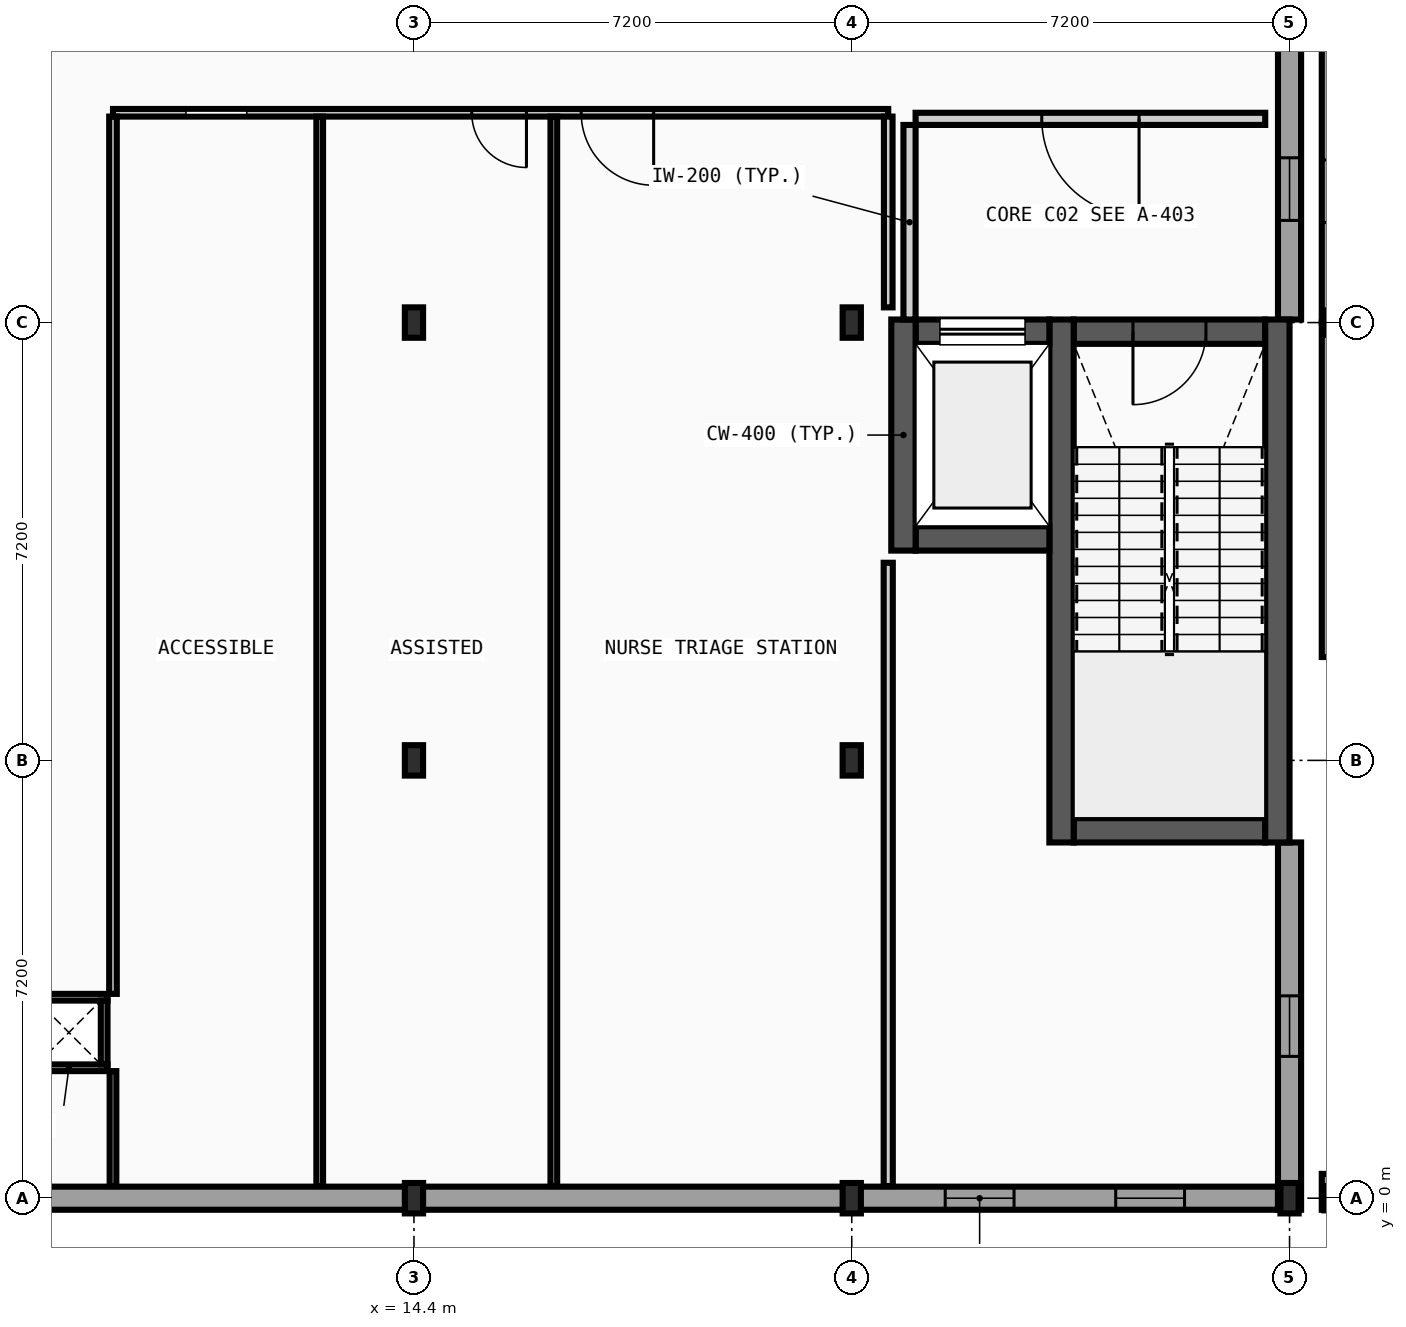
"""IFC4 building model, lengths in metres.
Left out: names, types, materials, properties, quantities, classifications, styles, units other than length and angle.
Written with IfcOpenShell. Run it as: python <this file> out.ifc"""

import sys

from ifc_helpers import new_model, si_unit, direction, frame, frame_2d, origin, origin_2d, place, context, subcontext, project, spatial, rectangle, i_section, extrude, element, fill, save


model = new_model("IFC4")
c1 = context("Model", 3, precision=1e-05, world=origin(), true_north=direction((0.0, 1.0)))
c2 = subcontext(c1, "Body", "Model", "MODEL_VIEW")
j1 = project(units=[si_unit("LENGTHUNIT", "METRE"), si_unit("PLANEANGLEUNIT", "RADIAN")], contexts=[c1])
p1 = place(None, origin())
s1 = spatial("IfcSite", under=j1, at=p1, CompositionType="ELEMENT")
p2 = place(p1, origin())
s2 = spatial("IfcBuilding", under=s1, at=p2, CompositionType="ELEMENT")
p3 = place(p2, frame((0.0, 0.0, 5.2)))
s3 = spatial("IfcBuildingStorey", under=s2, at=p3, CompositionType="ELEMENT", Elevation=5.2)
for number, where, z_axis, x_axis in (
    (1, (14.4, 0.0, 0.0), (0.0, 0.0, 1.0), (1.0, 0.0, 0.0)),
    (2, (14.4, 7.2, 0.0), (0.0, 0.0, 1.0), (1.0, 0.0, 0.0)),
    (3, (14.4, 14.4, 0.0), (0.0, 0.0, 1.0), (1.0, 0.0, 0.0)),
    (4, (21.6, 0.0, 0.0), (0.0, 0.0, 1.0), (1.0, 0.0, 0.0)),
    (5, (21.6, 7.2, 0.0), (0.0, 0.0, 1.0), (1.0, 0.0, 0.0)),
    (6, (21.6, 14.4, 0.0), (0.0, 0.0, 1.0), (1.0, 0.0, 0.0)),
    (7, (28.8, 0.0, 0.0), (0.0, 0.0, 1.0), (1.0, 0.0, 0.0)),
):
    element("IfcColumn", number, at=place(p3, frame(where, z_axis=z_axis, x_axis=x_axis)), inside=s3, PredefinedType="COLUMN", context=c2, shape_type="SweptSolid", body=[
        extrude(i_section(OverallWidth=0.3, OverallDepth=0.5, WebThickness=0.014, FlangeThickness=0.028, FilletRadius=0.027, at=origin_2d()), origin(), (0.0, 0.0, 1.0), 4.4),
    ])
for number, where, z_axis, x_axis in (
    (8, (29.52, 0.0, 0.0), (0.0, 0.0, 1.0), (1.0, 0.0, 0.0)),
    (9, (29.52, 14.4, 0.0), (0.0, 0.0, 1.0), (1.0, 0.0, 0.0)),
):
    element("IfcColumn", number, at=place(p3, frame(where, z_axis=z_axis, x_axis=x_axis)), inside=s3, PredefinedType="COLUMN", context=c2, shape_type="SweptSolid", body=[
        extrude(i_section(OverallWidth=0.3, OverallDepth=0.4, WebThickness=0.013, FlangeThickness=0.024, FilletRadius=0.027, at=origin_2d()), origin(), (0.0, 0.0, 1.0), 4.4),
    ])
p4 = place(p3, frame((7.2, 0.0, 0.0), z_axis=(0.0, 0.0, 1.0), x_axis=(1.0, 0.0, 0.0)))
e10 = element("IfcWall", 10, at=p4, inside=s3, PredefinedType="STANDARD", context=c2, shape_type="SweptSolid", body=[
    extrude(rectangle(XDim=7.2, YDim=0.38, at=frame_2d((3.6, 0.0))), origin(), (0.0, 0.0, 1.0), 3.88),
])
p5 = place(p3, frame((14.4, 0.0, 0.0), z_axis=(0.0, 0.0, 1.0), x_axis=(1.0, 0.0, 0.0)))
e11 = element("IfcWall", 11, at=p5, inside=s3, PredefinedType="STANDARD", context=c2, shape_type="SweptSolid", body=[
    extrude(rectangle(XDim=7.2, YDim=0.38, at=frame_2d((3.6, 0.0))), origin(), (0.0, 0.0, 1.0), 3.88),
])
p6 = place(p3, frame((21.6, 0.0, 0.0), z_axis=(0.0, 0.0, 1.0), x_axis=(1.0, 0.0, 0.0)))
e12 = element("IfcWall", 12, at=p6, inside=s3, PredefinedType="STANDARD", context=c2, shape_type="SweptSolid", body=[
    extrude(rectangle(XDim=7.01, YDim=0.38, at=frame_2d((3.505, 0.0))), origin(), (0.0, 0.0, 1.0), 3.88),
])
p7 = place(p6, frame((1.537, 0.0, 0.95)))
e13 = element("IfcOpeningElement", 13, at=p7, cuts=e12, PredefinedType="OPENING", context=c2, shape_type="SweptSolid", body=[
    extrude(rectangle(XDim=1.132, YDim=1.26, at=frame_2d((0.566, 0.63))), frame((0.0, 0.2, 0.0), z_axis=(0.0, -1.0, 0.0), x_axis=(1.0, 0.0, 0.0)), (0.0, 0.0, 1.0), 0.4),
])
p8 = place(p6, frame((4.341, 0.0, 0.95)))
e14 = element("IfcOpeningElement", 14, at=p8, cuts=e12, PredefinedType="OPENING", context=c2, shape_type="SweptSolid", body=[
    extrude(rectangle(XDim=1.132, YDim=1.26, at=frame_2d((0.566, 0.63))), frame((0.0, 0.2, 0.0), z_axis=(0.0, -1.0, 0.0), x_axis=(1.0, 0.0, 0.0)), (0.0, 0.0, 1.0), 0.4),
])
p9 = place(p3, frame((28.8, -0.19, 0.0), z_axis=(0.0, 0.0, 1.0), x_axis=(0.0, 1.0, 0.0)))
e15 = element("IfcWall", 15, at=p9, inside=s3, PredefinedType="STANDARD", context=c2, shape_type="SweptSolid", body=[
    extrude(rectangle(XDim=6.04, YDim=0.38, at=frame_2d((3.02, 0.0))), origin(), (0.0, 0.0, 1.0), 4.185),
])
p10 = place(p9, frame((2.522, 0.0, 0.95)))
e16 = element("IfcOpeningElement", 16, at=p10, cuts=e15, PredefinedType="OPENING", context=c2, shape_type="SweptSolid", body=[
    extrude(rectangle(XDim=0.996, YDim=1.296, at=frame_2d((0.498, 0.648))), frame((0.0, 0.2, 0.0), z_axis=(0.0, -1.0, 0.0), x_axis=(1.0, 0.0, 0.0)), (0.0, 0.0, 1.0), 0.4),
])
p11 = place(p3, frame((28.8, 14.45, 0.0), z_axis=(0.0, 0.0, 1.0), x_axis=(0.0, 1.0, 0.0)))
e17 = element("IfcWall", 17, at=p11, inside=s3, PredefinedType="STANDARD", context=c2, shape_type="SweptSolid", body=[
    extrude(rectangle(XDim=7.15, YDim=0.38, at=frame_2d((3.575, 0.0))), origin(), (0.0, 0.0, 1.0), 4.185),
])
p12 = place(p11, frame((1.63, 0.0, 0.95)))
e18 = element("IfcOpeningElement", 18, at=p12, cuts=e17, PredefinedType="OPENING", context=c2, shape_type="SweptSolid", body=[
    extrude(rectangle(XDim=1.03, YDim=1.296, at=frame_2d((0.515, 0.648))), frame((0.0, 0.2, 0.0), z_axis=(0.0, -1.0, 0.0), x_axis=(1.0, 0.0, 0.0)), (0.0, 0.0, 1.0), 0.4),
])
p13 = place(p11, frame((4.49, 0.0, 0.95)))
e19 = element("IfcOpeningElement", 19, at=p13, cuts=e17, PredefinedType="OPENING", context=c2, shape_type="SweptSolid", body=[
    extrude(rectangle(XDim=1.03, YDim=1.296, at=frame_2d((0.515, 0.648))), frame((0.0, 0.2, 0.0), z_axis=(0.0, -1.0, 0.0), x_axis=(1.0, 0.0, 0.0)), (0.0, 0.0, 1.0), 0.4),
])
p14 = place(p3, frame((29.52, 0.4, 0.0), z_axis=(0.0, 0.0, 1.0), x_axis=(0.0, -1.0, 0.0)))
e20 = element("IfcWall", 20, at=p14, inside=s3, PredefinedType="STANDARD", context=c2, shape_type="SweptSolid", body=[
    extrude(rectangle(XDim=0.59, YDim=0.38, at=frame_2d((0.295, 0.0))), origin(), (0.0, 0.0, 1.0), 4.185),
])
p15 = place(p3, frame((29.52, 14.4, 0.0), z_axis=(0.0, 0.0, 1.0), x_axis=(0.0, -1.0, 0.0)))
e21 = element("IfcWall", 21, at=p15, inside=s3, PredefinedType="STANDARD", context=c2, shape_type="SweptSolid", body=[
    extrude(rectangle(XDim=5.5, YDim=0.38, at=frame_2d((2.75, 0.0))), origin(), (0.0, 0.0, 1.0), 4.185),
])
p16 = place(p3, frame((29.52, 21.6, 0.0), z_axis=(0.0, 0.0, 1.0), x_axis=(0.0, -1.0, 0.0)))
e22 = element("IfcWall", 22, at=p16, inside=s3, PredefinedType="STANDARD", context=c2, shape_type="SweptSolid", body=[
    extrude(rectangle(XDim=7.2, YDim=0.38, at=frame_2d((3.6, 0.0))), origin(), (0.0, 0.0, 1.0), 3.88),
])
p17 = place(p16, frame((1.645, 0.0, 0.95)))
e23 = element("IfcOpeningElement", 23, at=p17, cuts=e22, PredefinedType="OPENING", context=c2, shape_type="SweptSolid", body=[
    extrude(rectangle(XDim=1.03, YDim=1.332, at=frame_2d((0.515, 0.666))), frame((0.0, 0.2, 0.0), z_axis=(0.0, -1.0, 0.0), x_axis=(1.0, 0.0, 0.0)), (0.0, 0.0, 1.0), 0.4),
])
p18 = place(p16, frame((4.525, 0.0, 0.95)))
e24 = element("IfcOpeningElement", 24, at=p18, cuts=e22, PredefinedType="OPENING", context=c2, shape_type="SweptSolid", body=[
    extrude(rectangle(XDim=1.03, YDim=1.332, at=frame_2d((0.515, 0.666))), frame((0.0, 0.2, 0.0), z_axis=(0.0, -1.0, 0.0), x_axis=(1.0, 0.0, 0.0)), (0.0, 0.0, 1.0), 0.4),
])
p19 = place(p3, frame((25.25, 6.05, 0.0), z_axis=(0.0, 0.0, 1.0), x_axis=(1.0, 0.0, 0.0)))
e25 = element("IfcWall", 25, at=p19, inside=s3, PredefinedType="SHEAR", context=c2, shape_type="SweptSolid", body=[
    extrude(rectangle(XDim=3.15, YDim=0.4, at=frame_2d((1.575, 0.0))), origin(), (0.0, 0.0, 1.0), 4.185),
])
p20 = place(p3, frame((25.25, 14.25, 0.0), z_axis=(0.0, 0.0, 1.0), x_axis=(1.0, 0.0, 0.0)))
e26 = element("IfcWall", 26, at=p20, inside=s3, PredefinedType="SHEAR", context=c2, shape_type="SweptSolid", body=[
    extrude(rectangle(XDim=3.15, YDim=0.4, at=frame_2d((1.575, 0.0))), origin(), (0.0, 0.0, 1.0), 4.185),
])
p21 = place(p20, frame((0.975, 0.0, 0.0)))
e27 = element("IfcOpeningElement", 27, at=p21, cuts=e26, PredefinedType="OPENING", context=c2, shape_type="SweptSolid", body=[
    extrude(rectangle(XDim=1.2, YDim=2.15, at=frame_2d((0.6, 1.075))), frame((0.0, 0.21, 0.0), z_axis=(0.0, -1.0, 0.0), x_axis=(1.0, 0.0, 0.0)), (0.0, 0.0, 1.0), 0.42),
])
for number, where, z_axis, x_axis in (
    (28, (25.05, 5.85, 0.0), (0.0, 0.0, 1.0), (0.0, 1.0, 0.0)),
    (29, (28.6, 5.85, 0.0), (0.0, 0.0, 1.0), (0.0, 1.0, 0.0)),
):
    element("IfcWall", number, at=place(p3, frame(where, z_axis=z_axis, x_axis=x_axis)), inside=s3, PredefinedType="SHEAR", context=c2, shape_type="SweptSolid", body=[
        extrude(rectangle(XDim=8.6, YDim=0.4, at=frame_2d((4.3, 0.0))), origin(), (0.0, 0.0, 1.0), 4.185),
    ])
p22 = place(p3, frame((22.65, 10.85, 0.0), z_axis=(0.0, 0.0, 1.0), x_axis=(1.0, 0.0, 0.0)))
e30 = element("IfcWall", 30, at=p22, inside=s3, PredefinedType="SHEAR", context=c2, shape_type="SweptSolid", body=[
    extrude(rectangle(XDim=2.2, YDim=0.4, at=frame_2d((1.1, 0.0))), origin(), (0.0, 0.0, 1.0), 4.185),
])
p23 = place(p3, frame((22.65, 14.25, 0.0), z_axis=(0.0, 0.0, 1.0), x_axis=(1.0, 0.0, 0.0)))
e31 = element("IfcWall", 31, at=p23, inside=s3, PredefinedType="SHEAR", context=c2, shape_type="SweptSolid", body=[
    extrude(rectangle(XDim=2.2, YDim=0.4, at=frame_2d((1.1, 0.0))), origin(), (0.0, 0.0, 1.0), 4.185),
])
p24 = place(p23, frame((0.4, 0.0, 0.0)))
e32 = element("IfcOpeningElement", 32, at=p24, cuts=e31, PredefinedType="OPENING", context=c2, shape_type="SweptSolid", body=[
    extrude(rectangle(XDim=1.4, YDim=2.2, at=frame_2d((0.7, 1.1))), frame((0.0, 0.21, 0.0), z_axis=(0.0, -1.0, 0.0), x_axis=(1.0, 0.0, 0.0)), (0.0, 0.0, 1.0), 0.42),
])
p25 = place(p3, frame((22.45, 10.65, 0.0), z_axis=(0.0, 0.0, 1.0), x_axis=(0.0, 1.0, 0.0)))
e33 = element("IfcWall", 33, at=p25, inside=s3, PredefinedType="SHEAR", context=c2, shape_type="SweptSolid", body=[
    extrude(rectangle(XDim=3.8, YDim=0.4, at=frame_2d((1.9, 0.0))), origin(), (0.0, 0.0, 1.0), 4.185),
])
p26 = place(p3, frame((22.65, 17.75, 0.0), z_axis=(0.0, 0.0, 1.0), x_axis=(1.0, 0.0, 0.0)))
e34 = element("IfcWall", 34, at=p26, inside=s3, PredefinedType="PARTITIONING", context=c2, shape_type="SweptSolid", body=[
    extrude(rectangle(XDim=5.75, YDim=0.2, at=frame_2d((2.875, 0.0))), origin(), (0.0, 0.0, 1.0), 4.185),
])
p27 = place(p26, frame((2.075, 0.0, 0.0)))
e35 = element("IfcOpeningElement", 35, at=p27, cuts=e34, PredefinedType="OPENING", context=c2, shape_type="SweptSolid", body=[
    extrude(rectangle(XDim=1.6, YDim=2.2, at=frame_2d((0.8, 1.1))), frame((0.0, 0.11, 0.0), z_axis=(0.0, -1.0, 0.0), x_axis=(1.0, 0.0, 0.0)), (0.0, 0.0, 1.0), 0.22),
])
p28 = place(p3, frame((22.55, 14.45, 0.0), z_axis=(0.0, 0.0, 1.0), x_axis=(0.0, 1.0, 0.0)))
e36 = element("IfcWall", 36, at=p28, inside=s3, PredefinedType="PARTITIONING", context=c2, shape_type="SweptSolid", body=[
    extrude(rectangle(XDim=3.2, YDim=0.2, at=frame_2d((1.6, 0.0))), origin(), (0.0, 0.0, 1.0), 4.185),
])
for number, where, z_axis, x_axis in (
    (37, (8.09, 2.145, 0.0), (0.0, 0.0, 1.0), (1.0, 0.0, 0.0)),
    (38, (8.09, 3.305, 0.0), (0.0, 0.0, 1.0), (1.0, 0.0, 0.0)),
):
    element("IfcWall", number, at=place(p3, frame(where, z_axis=z_axis, x_axis=x_axis)), inside=s3, PredefinedType="PARTITIONING", context=c2, shape_type="SweptSolid", body=[
        extrude(rectangle(XDim=1.27, YDim=0.11, at=frame_2d((0.635, 0.0))), origin(), (0.0, 0.0, 1.0), 4.185),
    ])
p29 = place(p3, frame((9.305, 2.2, 0.0), z_axis=(0.0, 0.0, 1.0), x_axis=(0.0, 1.0, 0.0)))
e39 = element("IfcWall", 39, at=p29, inside=s3, PredefinedType="PARTITIONING", context=c2, shape_type="SweptSolid", body=[
    extrude(rectangle(XDim=1.05, YDim=0.11, at=frame_2d((0.525, 0.0))), origin(), (0.0, 0.0, 1.0), 4.185),
])
p30 = place(p3, frame((9.45, 17.85, 0.0), z_axis=(0.0, 0.0, 1.0), x_axis=(1.0, 0.0, 0.0)))
e40 = element("IfcWall", 40, at=p30, inside=s3, PredefinedType="PARTITIONING", context=c2, shape_type="SweptSolid", body=[
    extrude(rectangle(XDim=12.75, YDim=0.125, at=frame_2d((6.375, 0.0))), origin(), (0.0, 0.0, 1.0), 4.185),
])
p31 = place(p30, frame((1.2, 0.0, 0.0)))
e41 = element("IfcOpeningElement", 41, at=p31, cuts=e40, PredefinedType="OPENING", context=c2, shape_type="SweptSolid", body=[
    extrude(rectangle(XDim=1.0, YDim=2.1, at=frame_2d((0.5, 1.05))), frame((0.0, 0.073, 0.0), z_axis=(0.0, -1.0, 0.0), x_axis=(1.0, 0.0, 0.0)), (0.0, 0.0, 1.0), 0.145),
])
p32 = place(p30, frame((5.9, 0.0, 0.0)))
e42 = element("IfcOpeningElement", 42, at=p32, cuts=e40, PredefinedType="OPENING", context=c2, shape_type="SweptSolid", body=[
    extrude(rectangle(XDim=0.9, YDim=2.1, at=frame_2d((0.45, 1.05))), frame((0.0, 0.073, 0.0), z_axis=(0.0, -1.0, 0.0), x_axis=(1.0, 0.0, 0.0)), (0.0, 0.0, 1.0), 0.145),
])
p33 = place(p30, frame((7.7, 0.0, 0.0)))
e43 = element("IfcOpeningElement", 43, at=p33, cuts=e40, PredefinedType="OPENING", context=c2, shape_type="SweptSolid", body=[
    extrude(rectangle(XDim=1.192, YDim=2.096, at=frame_2d((0.596, 1.048))), frame((0.0, 0.073, 0.0), z_axis=(0.0, -1.0, 0.0), x_axis=(1.0, 0.0, 0.0)), (0.0, 0.0, 1.0), 0.145),
])
p34 = place(p3, frame((9.45, 0.2, 0.0), z_axis=(0.0, 0.0, 1.0), x_axis=(0.0, 1.0, 0.0)))
e44 = element("IfcWall", 44, at=p34, inside=s3, PredefinedType="PARTITIONING", context=c2, shape_type="SweptSolid", body=[
    extrude(rectangle(XDim=1.89, YDim=0.11, at=frame_2d((0.945, 0.0))), origin(), (0.0, 0.0, 1.0), 3.9),
])
p35 = place(p3, frame((9.45, 3.36, 0.0), z_axis=(0.0, 0.0, 1.0), x_axis=(0.0, 1.0, 0.0)))
e45 = element("IfcWall", 45, at=p35, inside=s3, PredefinedType="PARTITIONING", context=c2, shape_type="SweptSolid", body=[
    extrude(rectangle(XDim=14.427, YDim=0.125, at=frame_2d((7.214, 0.0))), origin(), (0.0, 0.0, 1.0), 3.9),
])
p36 = place(p3, frame((12.85, 0.2, 0.0), z_axis=(0.0, 0.0, 1.0), x_axis=(0.0, 1.0, 0.0)))
e46 = element("IfcWall", 46, at=p36, inside=s3, PredefinedType="PARTITIONING", context=c2, shape_type="SweptSolid", body=[
    extrude(rectangle(XDim=17.588, YDim=0.11, at=frame_2d((8.794, 0.0))), origin(), (0.0, 0.0, 1.0), 4.185),
])
p37 = place(p3, frame((16.7, 0.2, 0.0), z_axis=(0.0, 0.0, 1.0), x_axis=(0.0, 1.0, 0.0)))
e47 = element("IfcWall", 47, at=p37, inside=s3, PredefinedType="PARTITIONING", context=c2, shape_type="SweptSolid", body=[
    extrude(rectangle(XDim=17.588, YDim=0.11, at=frame_2d((8.794, 0.0))), origin(), (0.0, 0.0, 1.0), 3.9),
])
p38 = place(p3, frame((22.2, 0.2, 0.0), z_axis=(0.0, 0.0, 1.0), x_axis=(0.0, 1.0, 0.0)))
e48 = element("IfcWall", 48, at=p38, inside=s3, PredefinedType="PARTITIONING", context=c2, shape_type="SweptSolid", body=[
    extrude(rectangle(XDim=10.25, YDim=0.15, at=frame_2d((5.125, 0.0))), origin(), (0.0, 0.0, 1.0), 4.185),
])
p39 = place(p3, frame((22.2, 14.65, 0.0), z_axis=(0.0, 0.0, 1.0), x_axis=(0.0, 1.0, 0.0)))
e49 = element("IfcWall", 49, at=p39, inside=s3, PredefinedType="PARTITIONING", context=c2, shape_type="SweptSolid", body=[
    extrude(rectangle(XDim=3.138, YDim=0.142, at=frame_2d((1.569, 0.0))), origin(), (0.0, 0.0, 1.0), 4.185),
])
p40 = place(p7, origin())
e50 = element("IfcWindow", 50, at=p40, inside=s3, PartitioningType="SINGLE_PANEL", PredefinedType="WINDOW", context=c2, shape_type="SweptSolid", body=[
    extrude(rectangle(XDim=1.132, YDim=1.26, at=frame_2d((0.566, 0.63))), frame((0.0, 0.03, 0.0), z_axis=(0.0, -1.0, 0.0), x_axis=(1.0, 0.0, 0.0)), (0.0, 0.0, 1.0), 0.06),
])
fill(e13, e50)
p41 = place(p8, origin())
e51 = element("IfcWindow", 51, at=p41, inside=s3, PartitioningType="SINGLE_PANEL", PredefinedType="WINDOW", context=c2, shape_type="SweptSolid", body=[
    extrude(rectangle(XDim=1.132, YDim=1.26, at=frame_2d((0.566, 0.63))), frame((0.0, 0.03, 0.0), z_axis=(0.0, -1.0, 0.0), x_axis=(1.0, 0.0, 0.0)), (0.0, 0.0, 1.0), 0.06),
])
fill(e14, e51)
p42 = place(p10, origin())
e52 = element("IfcWindow", 52, at=p42, inside=s3, PartitioningType="SINGLE_PANEL", PredefinedType="WINDOW", context=c2, shape_type="SweptSolid", body=[
    extrude(rectangle(XDim=0.996, YDim=1.296, at=frame_2d((0.498, 0.648))), frame((0.0, 0.03, 0.0), z_axis=(0.0, -1.0, 0.0), x_axis=(1.0, 0.0, 0.0)), (0.0, 0.0, 1.0), 0.06),
])
fill(e16, e52)
p43 = place(p12, origin())
e53 = element("IfcWindow", 53, at=p43, inside=s3, PartitioningType="SINGLE_PANEL", PredefinedType="WINDOW", context=c2, shape_type="SweptSolid", body=[
    extrude(rectangle(XDim=1.03, YDim=1.296, at=frame_2d((0.515, 0.648))), frame((0.0, 0.03, 0.0), z_axis=(0.0, -1.0, 0.0), x_axis=(1.0, 0.0, 0.0)), (0.0, 0.0, 1.0), 0.06),
])
fill(e18, e53)
p44 = place(p21, frame((1.2, 0.0, 0.0), z_axis=(0.0, 0.0, 1.0), x_axis=(-1.0, 0.0, 0.0)))
e54 = element("IfcDoor", 54, at=p44, inside=s3, OperationType="SINGLE_SWING_LEFT", PredefinedType="DOOR", context=c2, shape_type="SweptSolid", body=[
    extrude(rectangle(XDim=1.2, YDim=2.15, at=frame_2d((0.6, 1.075))), frame((0.0, 0.025, 0.0), z_axis=(0.0, -1.0, 0.0), x_axis=(1.0, 0.0, 0.0)), (0.0, 0.0, 1.0), 0.05),
])
fill(e27, e54)
p45 = place(p24, origin())
e55 = element("IfcDoor", 55, at=p45, inside=s3, OperationType="SLIDING_TO_LEFT", PredefinedType="DOOR", context=c2, shape_type="SweptSolid", body=[
    extrude(rectangle(XDim=1.4, YDim=2.2, at=frame_2d((0.7, 1.1))), frame((0.0, 0.025, 0.0), z_axis=(0.0, -1.0, 0.0), x_axis=(1.0, 0.0, 0.0)), (0.0, 0.0, 1.0), 0.05),
])
fill(e32, e55)
p46 = place(p27, origin())
e56 = element("IfcDoor", 56, at=p46, inside=s3, OperationType="DOUBLE_DOOR_SINGLE_SWING", PredefinedType="DOOR", context=c2, shape_type="SweptSolid", body=[
    extrude(rectangle(XDim=1.6, YDim=2.2, at=frame_2d((0.8, 1.1))), frame((0.0, 0.025, 0.0), z_axis=(0.0, -1.0, 0.0), x_axis=(1.0, 0.0, 0.0)), (0.0, 0.0, 1.0), 0.05),
])
fill(e35, e56)
p47 = place(p31, origin())
e57 = element("IfcDoor", 57, at=p47, inside=s3, OperationType="SLIDING_TO_LEFT", PredefinedType="DOOR", context=c2, shape_type="SweptSolid", body=[
    extrude(rectangle(XDim=1.0, YDim=2.1, at=frame_2d((0.5, 1.05))), frame((0.0, 0.025, 0.0), z_axis=(0.0, -1.0, 0.0), x_axis=(1.0, 0.0, 0.0)), (0.0, 0.0, 1.0), 0.05),
])
fill(e41, e57)
p48 = place(p32, origin())
e58 = element("IfcDoor", 58, at=p48, inside=s3, OperationType="SINGLE_SWING_RIGHT", PredefinedType="DOOR", context=c2, shape_type="SweptSolid", body=[
    extrude(rectangle(XDim=0.9, YDim=2.1, at=frame_2d((0.45, 1.05))), frame((0.0, 0.025, 0.0), z_axis=(0.0, -1.0, 0.0), x_axis=(1.0, 0.0, 0.0)), (0.0, 0.0, 1.0), 0.05),
])
fill(e42, e58)
p49 = place(p33, origin())
e59 = element("IfcDoor", 59, at=p49, inside=s3, OperationType="SINGLE_SWING_RIGHT", PredefinedType="DOOR", context=c2, shape_type="SweptSolid", body=[
    extrude(rectangle(XDim=1.192, YDim=2.096, at=frame_2d((0.596, 1.048))), frame((0.0, 0.025, 0.0), z_axis=(0.0, -1.0, 0.0), x_axis=(1.0, 0.0, 0.0)), (0.0, 0.0, 1.0), 0.05),
])
fill(e43, e59)
save(model, sys.argv[1])
